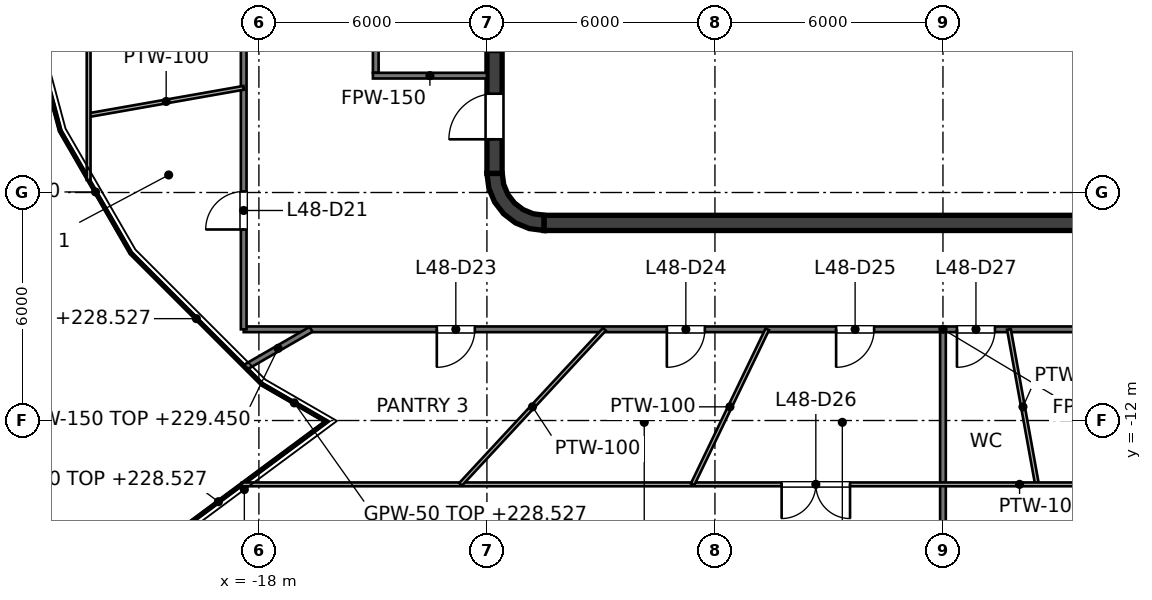
"""IFC4 building model, lengths in metres.
Left out: names, types, materials, properties, quantities, classifications, styles, units other than length and angle.
Written with IfcOpenShell. Run it as: python <this file> out.ifc"""

import sys

from ifc_helpers import new_model, si_unit, direction, frame, frame_2d, origin, place, context, subcontext, project, spatial, polyline, rectangle, outline, extrude, element, fill, save


model = new_model("IFC4")
c1 = context("Model", 3, precision=1e-05, world=origin(), true_north=direction((0.0, 1.0)))
c2 = subcontext(c1, "Body", "Model", "MODEL_VIEW")
j1 = project(units=[si_unit("LENGTHUNIT", "METRE"), si_unit("PLANEANGLEUNIT", "RADIAN")], contexts=[c1])
p1 = place(None, origin())
s1 = spatial("IfcSite", under=j1, at=p1, CompositionType="ELEMENT")
p2 = place(p1, origin())
s2 = spatial("IfcBuilding", under=s1, at=p2, CompositionType="ELEMENT")
p3 = place(p2, frame((0.0, 0.0, 225.6)))
s3 = spatial("IfcBuildingStorey", under=s2, at=p3, CompositionType="ELEMENT", Elevation=225.6)
p4 = place(p3, frame((-10.5, -6.8, 0.0), z_axis=(0.0, 0.0, 1.0), x_axis=(1.0, 0.0, 0.0)))
e1 = element("IfcWall", 1, at=p4, inside=s3, PredefinedType="SHEAR", context=c2, shape_type="SweptSolid", body=[
    extrude(rectangle(XDim=21.0, YDim=0.4, at=frame_2d((10.5, 0.0))), origin(), (0.0, 0.0, 1.0), 4.0),
])
p5 = place(p3, frame((-11.8, -5.5, 0.0), z_axis=(0.0, 0.0, 1.0), x_axis=(0.0, 1.0, 0.0)))
e2 = element("IfcWall", 2, at=p5, inside=s3, PredefinedType="SHEAR", context=c2, shape_type="SweptSolid", body=[
    extrude(rectangle(XDim=11.0, YDim=0.4, at=frame_2d((5.5, 0.0))), origin(), (0.0, 0.0, 1.0), 4.0),
])
p6 = place(p5, frame((3.2, 0.0, 0.0)))
e3 = element("IfcOpeningElement", 3, at=p6, cuts=e2, PredefinedType="OPENING", context=c2, shape_type="SweptSolid", body=[
    extrude(rectangle(XDim=1.0, YDim=2.1, at=frame_2d((0.5, 1.05))), frame((0.0, 0.2, 0.0), z_axis=(0.0, -1.0, 0.0), x_axis=(1.0, 0.0, 0.0)), (0.0, 0.0, 1.0), 0.4),
])
p7 = place(p5, frame((6.1, 0.0, 0.0)))
e4 = element("IfcOpeningElement", 4, at=p7, cuts=e2, PredefinedType="OPENING", context=c2, shape_type="SweptSolid", body=[
    extrude(rectangle(XDim=1.0, YDim=2.1, at=frame_2d((0.5, 1.05))), frame((0.0, 0.2, 0.0), z_axis=(0.0, -1.0, 0.0), x_axis=(1.0, 0.0, 0.0)), (0.0, 0.0, 1.0), 0.4),
])
p8 = place(p5, frame((0.9, 0.0, 0.0)))
e5 = element("IfcOpeningElement", 5, at=p8, cuts=e2, PredefinedType="OPENING", context=c2, shape_type="SweptSolid", body=[
    extrude(rectangle(XDim=1.2, YDim=2.1, at=frame_2d((0.6, 1.05))), frame((0.0, 0.2, 0.0), z_axis=(0.0, -1.0, 0.0), x_axis=(1.0, 0.0, 0.0)), (0.0, 0.0, 1.0), 0.4),
])
p9 = place(p5, frame((8.9, 0.0, 0.0)))
e6 = element("IfcOpeningElement", 6, at=p9, cuts=e2, PredefinedType="OPENING", context=c2, shape_type="SweptSolid", body=[
    extrude(rectangle(XDim=1.2, YDim=2.1, at=frame_2d((0.6, 1.05))), frame((0.0, 0.2, 0.0), z_axis=(0.0, -1.0, 0.0), x_axis=(1.0, 0.0, 0.0)), (0.0, 0.0, 1.0), 0.4),
])
p10 = place(p3, origin())
e7 = element("IfcWall", 7, at=p10, inside=s3, PredefinedType="SHEAR", context=c2, shape_type="SweptSolid", body=[
    extrude(outline(polyline([(-10.5, -7.0), (-10.5, -6.596), (-10.784, -6.559), (-11.048, -6.45), (-11.275, -6.275), (-11.45, -6.048), (-11.559, -5.784), (-11.596, -5.5), (-12.0, -5.5), (-11.949, -5.888), (-11.799, -6.25), (-11.561, -6.561), (-11.25, -6.799), (-10.888, -6.949), (-10.5, -7.0)])), origin(), (0.0, 0.0, 1.0), 4.0),
])
p11 = place(p3, frame((0.3, -6.6, 0.0), z_axis=(0.0, 0.0, 1.0), x_axis=(0.0, 1.0, 0.0)))
e8 = element("IfcWall", 8, at=p11, inside=s3, PredefinedType="PARTITIONING", context=c2, shape_type="SweptSolid", body=[
    extrude(rectangle(XDim=2.5, YDim=0.15, at=frame_2d((1.25, 0.0))), origin(), (0.0, 0.0, 1.0), 3.85),
])
p12 = place(p11, frame((0.8, 0.0, 0.0)))
e9 = element("IfcOpeningElement", 9, at=p12, cuts=e8, PredefinedType="OPENING", context=c2, shape_type="SweptSolid", body=[
    extrude(rectangle(XDim=0.9, YDim=2.1, at=frame_2d((0.45, 1.05))), frame((0.0, 0.075, 0.0), z_axis=(0.0, -1.0, 0.0), x_axis=(1.0, 0.0, 0.0)), (0.0, 0.0, 1.0), 0.15),
])
p13 = place(p3, frame((-9.0, -6.6, 0.0), z_axis=(0.0, 0.0, 1.0), x_axis=(0.0, 1.0, 0.0)))
e10 = element("IfcWall", 10, at=p13, inside=s3, PredefinedType="PARTITIONING", context=c2, shape_type="SweptSolid", body=[
    extrude(rectangle(XDim=2.5, YDim=0.25, at=frame_2d((1.25, 0.0))), origin(), (0.0, 0.0, 1.0), 3.85),
])
p14 = place(p13, frame((0.75, 0.0, 0.0)))
e11 = element("IfcOpeningElement", 11, at=p14, cuts=e10, PredefinedType="OPENING", context=c2, shape_type="SweptSolid", body=[
    extrude(rectangle(XDim=1.0, YDim=2.1, at=frame_2d((0.5, 1.05))), frame((0.0, 0.125, 0.0), z_axis=(0.0, -1.0, 0.0), x_axis=(1.0, 0.0, 0.0)), (0.0, 0.0, 1.0), 0.25),
])
p15 = place(p3, frame((3.15, -6.6, 0.0), z_axis=(0.0, 0.0, 1.0), x_axis=(0.0, 1.0, 0.0)))
e12 = element("IfcWall", 12, at=p15, inside=s3, PredefinedType="SOLIDWALL", context=c2, shape_type="SweptSolid", body=[
    extrude(rectangle(XDim=2.5, YDim=0.25, at=frame_2d((1.25, 0.0))), origin(), (0.0, 0.0, 1.0), 3.85),
])
p16 = place(p3, frame((-2.9, -6.6, 0.0), z_axis=(0.0, 0.0, 1.0), x_axis=(0.0, 1.0, 0.0)))
e13 = element("IfcWall", 13, at=p16, inside=s3, PredefinedType="PARTITIONING", context=c2, shape_type="SweptSolid", body=[
    extrude(rectangle(XDim=2.5, YDim=0.25, at=frame_2d((1.25, 0.0))), origin(), (0.0, 0.0, 1.0), 3.85),
])
p17 = place(p16, frame((0.8, 0.0, 0.0)))
e14 = element("IfcOpeningElement", 14, at=p17, cuts=e13, PredefinedType="OPENING", context=c2, shape_type="SweptSolid", body=[
    extrude(rectangle(XDim=0.9, YDim=2.1, at=frame_2d((0.45, 1.05))), frame((0.0, 0.125, 0.0), z_axis=(0.0, -1.0, 0.0), x_axis=(1.0, 0.0, 0.0)), (0.0, 0.0, 1.0), 0.25),
])
p18 = place(p3, frame((-9.125, -3.975, 0.0), z_axis=(0.0, 0.0, 1.0), x_axis=(1.0, 0.0, 0.0)))
e15 = element("IfcWall", 15, at=p18, inside=s3, PredefinedType="SOLIDWALL", context=c2, shape_type="SweptSolid", body=[
    extrude(rectangle(XDim=12.4, YDim=0.25, at=frame_2d((6.2, 0.0))), origin(), (0.0, 0.0, 1.0), 3.85),
])
p19 = place(p18, frame((1.05, 0.0, 0.0)))
e16 = element("IfcOpeningElement", 16, at=p19, cuts=e15, PredefinedType="OPENING", context=c2, shape_type="SweptSolid", body=[
    extrude(rectangle(XDim=1.2, YDim=2.1, at=frame_2d((0.6, 1.05))), frame((0.0, 0.125, 0.0), z_axis=(0.0, -1.0, 0.0), x_axis=(1.0, 0.0, 0.0)), (0.0, 0.0, 1.0), 0.25),
])
p20 = place(p18, frame((4.1, 0.0, 0.0)))
e17 = element("IfcOpeningElement", 17, at=p20, cuts=e15, PredefinedType="OPENING", context=c2, shape_type="SweptSolid", body=[
    extrude(rectangle(XDim=1.2, YDim=2.1, at=frame_2d((0.6, 1.05))), frame((0.0, 0.125, 0.0), z_axis=(0.0, -1.0, 0.0), x_axis=(1.0, 0.0, 0.0)), (0.0, 0.0, 1.0), 0.25),
])
p21 = place(p3, frame((3.275, -3.975, 0.0), z_axis=(0.0, 0.0, 1.0), x_axis=(1.0, 0.0, 0.0)))
e18 = element("IfcWall", 18, at=p21, inside=s3, PredefinedType="SOLIDWALL", context=c2, shape_type="SweptSolid", body=[
    extrude(rectangle(XDim=5.85, YDim=0.25, at=frame_2d((2.925, 0.0))), origin(), (0.0, 0.0, 1.0), 3.85),
])
for number, where, z_axis, x_axis in (
    (19, (-9.0, -3.85, 0.0), (0.0, 0.0, 1.0), (0.0, 1.0, 0.0)),
    (20, (-5.95, -3.85, 0.0), (0.0, 0.0, 1.0), (0.0, 1.0, 0.0)),
    (21, (-2.9, -3.85, 0.0), (0.0, 0.0, 1.0), (0.0, 1.0, 0.0)),
    (22, (0.15, -3.85, 0.0), (0.0, 0.0, 1.0), (0.0, 1.0, 0.0)),
    (23, (3.2, -3.85, 0.0), (0.0, 0.0, 1.0), (0.0, 1.0, 0.0)),
):
    element("IfcWall", number, at=place(p3, frame(where, z_axis=z_axis, x_axis=x_axis)), inside=s3, PredefinedType="SOLIDWALL", context=c2, shape_type="SweptSolid", body=[
        extrude(rectangle(XDim=2.2, YDim=0.25, at=frame_2d((1.1, 0.0))), origin(), (0.0, 0.0, 1.0), 3.85),
    ])
p22 = place(p3, frame((-14.925, -2.85, 0.0), z_axis=(0.0, 0.0, 1.0), x_axis=(0.0, 1.0, 0.0)))
e24 = element("IfcWall", 24, at=p22, inside=s3, PredefinedType="PARTITIONING", context=c2, shape_type="SweptSolid", body=[
    extrude(rectangle(XDim=5.7, YDim=0.15, at=frame_2d((2.85, 0.0))), origin(), (0.0, 0.0, 1.0), 2.918),
])
p23 = place(p3, frame((-15.0, -2.925, 0.0), z_axis=(0.0, 0.0, 1.0), x_axis=(1.0, 0.0, 0.0)))
e25 = element("IfcWall", 25, at=p23, inside=s3, PredefinedType="PARTITIONING", context=c2, shape_type="SweptSolid", body=[
    extrude(rectangle(XDim=3.0, YDim=0.15, at=frame_2d((1.5, 0.0))), origin(), (0.0, 0.0, 1.0), 2.918),
])
p24 = place(p3, frame((-18.4, -9.6, 0.0), z_axis=(0.0, 0.0, 1.0), x_axis=(1.0, 0.0, 0.0)))
e26 = element("IfcWall", 26, at=p24, inside=s3, PredefinedType="PARTITIONING", context=c2, shape_type="SweptSolid", body=[
    extrude(rectangle(XDim=36.8, YDim=0.15, at=frame_2d((18.4, 0.0))), origin(), (0.0, 0.0, 1.0), 2.927),
])
p25 = place(p24, frame((5.082, 0.0, 0.0)))
e27 = element("IfcOpeningElement", 27, at=p25, cuts=e26, PredefinedType="OPENING", context=c2, shape_type="SweptSolid", body=[
    extrude(rectangle(XDim=1.0, YDim=2.1, at=frame_2d((0.5, 1.05))), frame((0.0, 0.075, 0.0), z_axis=(0.0, -1.0, 0.0), x_axis=(1.0, 0.0, 0.0)), (0.0, 0.0, 1.0), 0.15),
])
p26 = place(p24, frame((11.135, 0.0, 0.0)))
e28 = element("IfcOpeningElement", 28, at=p26, cuts=e26, PredefinedType="OPENING", context=c2, shape_type="SweptSolid", body=[
    extrude(rectangle(XDim=1.0, YDim=2.1, at=frame_2d((0.5, 1.05))), frame((0.0, 0.075, 0.0), z_axis=(0.0, -1.0, 0.0), x_axis=(1.0, 0.0, 0.0)), (0.0, 0.0, 1.0), 0.15),
])
p27 = place(p24, frame((15.588, 0.0, 0.0)))
e29 = element("IfcOpeningElement", 29, at=p27, cuts=e26, PredefinedType="OPENING", context=c2, shape_type="SweptSolid", body=[
    extrude(rectangle(XDim=1.0, YDim=2.1, at=frame_2d((0.5, 1.05))), frame((0.0, 0.075, 0.0), z_axis=(0.0, -1.0, 0.0), x_axis=(1.0, 0.0, 0.0)), (0.0, 0.0, 1.0), 0.15),
])
p28 = place(p24, frame((18.768, 0.0, 0.0)))
e30 = element("IfcOpeningElement", 30, at=p28, cuts=e26, PredefinedType="OPENING", context=c2, shape_type="SweptSolid", body=[
    extrude(rectangle(XDim=1.0, YDim=2.1, at=frame_2d((0.5, 1.05))), frame((0.0, 0.075, 0.0), z_axis=(0.0, -1.0, 0.0), x_axis=(1.0, 0.0, 0.0)), (0.0, 0.0, 1.0), 0.15),
])
p29 = place(p24, frame((27.968, 0.0, 0.0)))
e31 = element("IfcOpeningElement", 31, at=p29, cuts=e26, PredefinedType="OPENING", context=c2, shape_type="SweptSolid", body=[
    extrude(rectangle(XDim=1.0, YDim=2.1, at=frame_2d((0.5, 1.05))), frame((0.0, 0.075, 0.0), z_axis=(0.0, -1.0, 0.0), x_axis=(1.0, 0.0, 0.0)), (0.0, 0.0, 1.0), 0.15),
])
p30 = place(p3, frame((-18.362, -10.602, 0.0), z_axis=(0.0, 0.0, 1.0), x_axis=(0.865998815133, 0.500046050067, 0.0)))
e32 = element("IfcWall", 32, at=p30, inside=s3, PredefinedType="PARTITIONING", context=c2, shape_type="SweptSolid", body=[
    extrude(rectangle(XDim=2.003, YDim=0.15, at=frame_2d((1.001, 0.0))), origin(), (0.0, 0.0, 1.0), 3.85),
])
p31 = place(p3, frame((0.0, -22.903, 0.0), z_axis=(0.0, 0.0, 1.0), x_axis=(0.0, 1.0, 0.0)))
e33 = element("IfcWall", 33, at=p31, inside=s3, PredefinedType="PARTITIONING", context=c2, shape_type="SweptSolid", body=[
    extrude(rectangle(XDim=13.303, YDim=0.15, at=frame_2d((6.651, 0.0))), origin(), (0.0, 0.0, 1.0), 2.995),
])
p32 = place(p3, frame((-18.4, -9.6, 0.0), z_axis=(0.0, 0.0, 1.0), x_axis=(0.0, 1.0, 0.0)))
e34 = element("IfcWall", 34, at=p32, inside=s3, PredefinedType="PARTITIONING", context=c2, shape_type="SweptSolid", body=[
    extrude(rectangle(XDim=19.2, YDim=0.15, at=frame_2d((9.6, 0.0))), origin(), (0.0, 0.0, 1.0), 2.918),
])
p33 = place(p32, frame((16.655, 0.0, 0.0)))
e35 = element("IfcOpeningElement", 35, at=p33, cuts=e34, PredefinedType="OPENING", context=c2, shape_type="SweptSolid", body=[
    extrude(rectangle(XDim=1.0, YDim=2.1, at=frame_2d((0.5, 1.05))), frame((0.0, 0.075, 0.0), z_axis=(0.0, -1.0, 0.0), x_axis=(1.0, 0.0, 0.0)), (0.0, 0.0, 1.0), 0.15),
])
p34 = place(p32, frame((12.39, 0.0, 0.0)))
e36 = element("IfcOpeningElement", 36, at=p34, cuts=e34, PredefinedType="OPENING", context=c2, shape_type="SweptSolid", body=[
    extrude(rectangle(XDim=1.0, YDim=2.1, at=frame_2d((0.5, 1.05))), frame((0.0, 0.075, 0.0), z_axis=(0.0, -1.0, 0.0), x_axis=(1.0, 0.0, 0.0)), (0.0, 0.0, 1.0), 0.15),
])
p35 = place(p32, frame((7.963, 0.0, 0.0)))
e37 = element("IfcOpeningElement", 37, at=p35, cuts=e34, PredefinedType="OPENING", context=c2, shape_type="SweptSolid", body=[
    extrude(rectangle(XDim=1.0, YDim=2.1, at=frame_2d((0.5, 1.05))), frame((0.0, 0.075, 0.0), z_axis=(0.0, -1.0, 0.0), x_axis=(1.0, 0.0, 0.0)), (0.0, 0.0, 1.0), 0.15),
])
p36 = place(p32, frame((2.627, 0.0, 0.0)))
e38 = element("IfcOpeningElement", 38, at=p36, cuts=e34, PredefinedType="OPENING", context=c2, shape_type="SweptSolid", body=[
    extrude(rectangle(XDim=1.0, YDim=2.1, at=frame_2d((0.5, 1.05))), frame((0.0, 0.075, 0.0), z_axis=(0.0, -1.0, 0.0), x_axis=(1.0, 0.0, 0.0)), (0.0, 0.0, 1.0), 0.15),
])
p37 = place(p3, frame((-24.019, -1.424, 0.0), z_axis=(0.0, 0.0, 1.0), x_axis=(0.259054071109, -0.965862820613, 0.0)))
e39 = element("IfcWall", 39, at=p37, inside=s3, PredefinedType="PARTITIONING", context=c2, shape_type="SweptSolid", body=[
    extrude(rectangle(XDim=3.057, YDim=0.05, at=frame_2d((1.529, 0.0))), origin(), (0.0, 0.0, 1.0), 2.918),
])
p38 = place(p3, frame((-23.227, -4.377, 0.0), z_axis=(0.0, 0.0, 1.0), x_axis=(0.49991400307, -0.866075048442, 0.0)))
e40 = element("IfcWall", 40, at=p38, inside=s3, PredefinedType="PARTITIONING", context=c2, shape_type="SweptSolid", body=[
    extrude(rectangle(XDim=3.715, YDim=0.05, at=frame_2d((1.857, 0.0))), origin(), (0.0, 0.0, 1.0), 2.918),
])
p39 = place(p3, frame((-21.37, -7.594, 0.0), z_axis=(0.0, 0.0, 1.0), x_axis=(0.70713179248, -0.707081769008, 0.0)))
e41 = element("IfcWall", 41, at=p39, inside=s3, PredefinedType="PARTITIONING", context=c2, shape_type="SweptSolid", body=[
    extrude(rectangle(XDim=4.881, YDim=0.05, at=frame_2d((2.44, 0.0))), origin(), (0.0, 0.0, 1.0), 2.927),
])
p40 = place(p3, frame((-17.919, -11.045, 0.0), z_axis=(0.0, 0.0, 1.0), x_axis=(0.865868664307, -0.500271382523, 0.0)))
e42 = element("IfcWall", 42, at=p40, inside=s3, PredefinedType="PARTITIONING", context=c2, shape_type="SweptSolid", body=[
    extrude(rectangle(XDim=1.963, YDim=0.05, at=frame_2d((0.982, 0.0))), origin(), (0.0, 0.0, 1.0), 2.927),
])
p41 = place(p3, frame((-21.91, -16.247, 0.0), z_axis=(0.0, 0.0, 1.0), x_axis=(0.803238431987, 0.595657637724, 0.0)))
e43 = element("IfcWall", 43, at=p41, inside=s3, PredefinedType="PARTITIONING", context=c2, shape_type="SweptSolid", body=[
    extrude(rectangle(XDim=7.085, YDim=0.05, at=frame_2d((3.542, 0.0))), origin(), (0.0, 0.0, 1.0), 2.927),
])
p42 = place(p3, frame((1.736, -9.6, 0.0), z_axis=(0.0, 0.0, 1.0), x_axis=(0.178009628273, -0.984028745638, 0.0)))
e44 = element("IfcWall", 44, at=p42, inside=s3, PredefinedType="PARTITIONING", context=c2, shape_type="SweptSolid", body=[
    extrude(rectangle(XDim=4.146, YDim=0.1, at=frame_2d((2.073, 0.0))), origin(), (0.0, 0.0, 1.0), 3.85),
])
p43 = place(p3, frame((-18.448, -13.68, 0.0), z_axis=(0.0, 0.0, 1.0), x_axis=(1.0, 0.0, 0.0)))
e45 = element("IfcWall", 45, at=p43, inside=s3, PredefinedType="PARTITIONING", context=c2, shape_type="SweptSolid", body=[
    extrude(rectangle(XDim=40.928, YDim=0.1, at=frame_2d((20.464, 0.0))), origin(), (0.0, 0.0, 1.0), 2.927),
])
p44 = place(p43, frame((14.203, 0.0, 0.0)))
e46 = element("IfcOpeningElement", 46, at=p44, cuts=e45, PredefinedType="OPENING", context=c2, shape_type="SweptSolid", body=[
    extrude(rectangle(XDim=1.8, YDim=2.1, at=frame_2d((0.9, 1.05))), frame((0.0, 0.05, 0.0), z_axis=(0.0, -1.0, 0.0), x_axis=(1.0, 0.0, 0.0)), (0.0, 0.0, 1.0), 0.1),
])
p45 = place(p43, frame((30.025, 0.0, 0.0)))
e47 = element("IfcOpeningElement", 47, at=p45, cuts=e45, PredefinedType="OPENING", context=c2, shape_type="SweptSolid", body=[
    extrude(rectangle(XDim=1.8, YDim=2.1, at=frame_2d((0.9, 1.05))), frame((0.0, 0.05, 0.0), z_axis=(0.0, -1.0, 0.0), x_axis=(1.0, 0.0, 0.0)), (0.0, 0.0, 1.0), 0.1),
])
p46 = place(p3, frame((-22.48, -3.964, 0.0), z_axis=(0.0, 0.0, 1.0), x_axis=(0.984825650465, 0.173546645561, 0.0)))
e48 = element("IfcWall", 48, at=p46, inside=s3, PredefinedType="PARTITIONING", context=c2, shape_type="SweptSolid", body=[
    extrude(rectangle(XDim=4.143, YDim=0.1, at=frame_2d((2.072, 0.0))), origin(), (0.0, 0.0, 1.0), 3.85),
])
p47 = place(p3, frame((-12.693, -13.68, 0.0), z_axis=(0.0, 0.0, 1.0), x_axis=(0.680136385704, 0.733085599942, 0.0)))
e49 = element("IfcWall", 49, at=p47, inside=s3, PredefinedType="PARTITIONING", context=c2, shape_type="SweptSolid", body=[
    extrude(rectangle(XDim=5.565, YDim=0.1, at=frame_2d((2.783, 0.0))), origin(), (0.0, 0.0, 1.0), 3.85),
])
p48 = place(p3, frame((-6.588, -13.68, 0.0), z_axis=(0.0, 0.0, 1.0), x_axis=(0.43390153131, 0.900960299418, 0.0)))
e50 = element("IfcWall", 50, at=p48, inside=s3, PredefinedType="PARTITIONING", context=c2, shape_type="SweptSolid", body=[
    extrude(rectangle(XDim=4.528, YDim=0.1, at=frame_2d((2.264, 0.0))), origin(), (0.0, 0.0, 1.0), 3.85),
])
p49 = place(p3, frame((-22.48, -5.671, 0.0), z_axis=(0.0, 0.0, 1.0), x_axis=(0.0, 1.0, 0.0)))
e51 = element("IfcWall", 51, at=p49, inside=s3, PredefinedType="PARTITIONING", context=c2, shape_type="SweptSolid", body=[
    extrude(rectangle(XDim=19.351, YDim=0.1, at=frame_2d((9.675, 0.0))), origin(), (0.0, 0.0, 1.0), 2.918),
])
p50 = place(p49, frame((15.025, 0.0, 0.0)))
e52 = element("IfcOpeningElement", 52, at=p50, cuts=e51, PredefinedType="OPENING", context=c2, shape_type="SweptSolid", body=[
    extrude(rectangle(XDim=0.9, YDim=2.1, at=frame_2d((0.45, 1.05))), frame((0.0, 0.05, 0.0), z_axis=(0.0, -1.0, 0.0), x_axis=(1.0, 0.0, 0.0)), (0.0, 0.0, 1.0), 0.1),
])
p51 = place(p19, origin())
e53 = element("IfcDoor", 53, at=p51, inside=s3, OperationType="DOUBLE_DOOR_SLIDING", PredefinedType="DOOR", context=c2, shape_type="SweptSolid", body=[
    extrude(rectangle(XDim=1.2, YDim=2.1, at=frame_2d((0.6, 1.05))), frame((0.0, 0.025, 0.0), z_axis=(0.0, -1.0, 0.0), x_axis=(1.0, 0.0, 0.0)), (0.0, 0.0, 1.0), 0.05),
])
fill(e16, e53)
p52 = place(p20, origin())
e54 = element("IfcDoor", 54, at=p52, inside=s3, OperationType="DOUBLE_DOOR_SLIDING", PredefinedType="DOOR", context=c2, shape_type="SweptSolid", body=[
    extrude(rectangle(XDim=1.2, YDim=2.1, at=frame_2d((0.6, 1.05))), frame((0.0, 0.025, 0.0), z_axis=(0.0, -1.0, 0.0), x_axis=(1.0, 0.0, 0.0)), (0.0, 0.0, 1.0), 0.05),
])
fill(e17, e54)
p53 = place(p14, origin())
e55 = element("IfcDoor", 55, at=p53, inside=s3, OperationType="SINGLE_SWING_LEFT", PredefinedType="DOOR", context=c2, shape_type="SweptSolid", body=[
    extrude(rectangle(XDim=1.0, YDim=2.1, at=frame_2d((0.5, 1.05))), frame((0.0, 0.025, 0.0), z_axis=(0.0, -1.0, 0.0), x_axis=(1.0, 0.0, 0.0)), (0.0, 0.0, 1.0), 0.05),
])
fill(e11, e55)
p54 = place(p17, origin())
e56 = element("IfcDoor", 56, at=p54, inside=s3, OperationType="SINGLE_SWING_RIGHT", PredefinedType="DOOR", context=c2, shape_type="SweptSolid", body=[
    extrude(rectangle(XDim=0.9, YDim=2.1, at=frame_2d((0.45, 1.05))), frame((0.0, 0.025, 0.0), z_axis=(0.0, -1.0, 0.0), x_axis=(1.0, 0.0, 0.0)), (0.0, 0.0, 1.0), 0.05),
])
fill(e14, e56)
p55 = place(p12, origin())
e57 = element("IfcDoor", 57, at=p55, inside=s3, OperationType="SINGLE_SWING_RIGHT", PredefinedType="DOOR", context=c2, shape_type="SweptSolid", body=[
    extrude(rectangle(XDim=0.9, YDim=2.1, at=frame_2d((0.45, 1.05))), frame((0.0, 0.025, 0.0), z_axis=(0.0, -1.0, 0.0), x_axis=(1.0, 0.0, 0.0)), (0.0, 0.0, 1.0), 0.05),
])
fill(e9, e57)
p56 = place(p8, origin())
e58 = element("IfcDoor", 58, at=p56, inside=s3, OperationType="SINGLE_SWING_LEFT", PredefinedType="DOOR", context=c2, shape_type="SweptSolid", body=[
    extrude(rectangle(XDim=1.2, YDim=2.1, at=frame_2d((0.6, 1.05))), frame((0.0, 0.025, 0.0), z_axis=(0.0, -1.0, 0.0), x_axis=(1.0, 0.0, 0.0)), (0.0, 0.0, 1.0), 0.05),
])
fill(e5, e58)
p57 = place(p36, origin())
e59 = element("IfcDoor", 59, at=p57, inside=s3, OperationType="SINGLE_SWING_LEFT", PredefinedType="DOOR", context=c2, shape_type="SweptSolid", body=[
    extrude(rectangle(XDim=1.0, YDim=2.1, at=frame_2d((0.5, 1.05))), frame((0.0, 0.025, 0.0), z_axis=(0.0, -1.0, 0.0), x_axis=(1.0, 0.0, 0.0)), (0.0, 0.0, 1.0), 0.05),
])
fill(e38, e59)
p58 = place(p25, origin())
e60 = element("IfcDoor", 60, at=p58, inside=s3, OperationType="SINGLE_SWING_LEFT", PredefinedType="DOOR", context=c2, shape_type="SweptSolid", body=[
    extrude(rectangle(XDim=1.0, YDim=2.1, at=frame_2d((0.5, 1.05))), frame((0.0, 0.025, 0.0), z_axis=(0.0, -1.0, 0.0), x_axis=(1.0, 0.0, 0.0)), (0.0, 0.0, 1.0), 0.05),
])
fill(e27, e60)
p59 = place(p26, origin())
e61 = element("IfcDoor", 61, at=p59, inside=s3, OperationType="SINGLE_SWING_LEFT", PredefinedType="DOOR", context=c2, shape_type="SweptSolid", body=[
    extrude(rectangle(XDim=1.0, YDim=2.1, at=frame_2d((0.5, 1.05))), frame((0.0, 0.025, 0.0), z_axis=(0.0, -1.0, 0.0), x_axis=(1.0, 0.0, 0.0)), (0.0, 0.0, 1.0), 0.05),
])
fill(e28, e61)
p60 = place(p27, origin())
e62 = element("IfcDoor", 62, at=p60, inside=s3, OperationType="SINGLE_SWING_LEFT", PredefinedType="DOOR", context=c2, shape_type="SweptSolid", body=[
    extrude(rectangle(XDim=1.0, YDim=2.1, at=frame_2d((0.5, 1.05))), frame((0.0, 0.025, 0.0), z_axis=(0.0, -1.0, 0.0), x_axis=(1.0, 0.0, 0.0)), (0.0, 0.0, 1.0), 0.05),
])
fill(e29, e62)
p61 = place(p44, origin())
e63 = element("IfcDoor", 63, at=p61, inside=s3, OperationType="DOUBLE_DOOR_SINGLE_SWING", PredefinedType="DOOR", context=c2, shape_type="SweptSolid", body=[
    extrude(rectangle(XDim=1.8, YDim=2.1, at=frame_2d((0.9, 1.05))), frame((0.0, 0.025, 0.0), z_axis=(0.0, -1.0, 0.0), x_axis=(1.0, 0.0, 0.0)), (0.0, 0.0, 1.0), 0.05),
])
fill(e46, e63)
p62 = place(p28, origin())
e64 = element("IfcDoor", 64, at=p62, inside=s3, OperationType="SINGLE_SWING_LEFT", PredefinedType="DOOR", context=c2, shape_type="SweptSolid", body=[
    extrude(rectangle(XDim=1.0, YDim=2.1, at=frame_2d((0.5, 1.05))), frame((0.0, 0.025, 0.0), z_axis=(0.0, -1.0, 0.0), x_axis=(1.0, 0.0, 0.0)), (0.0, 0.0, 1.0), 0.05),
])
fill(e30, e64)
save(model, sys.argv[1])
